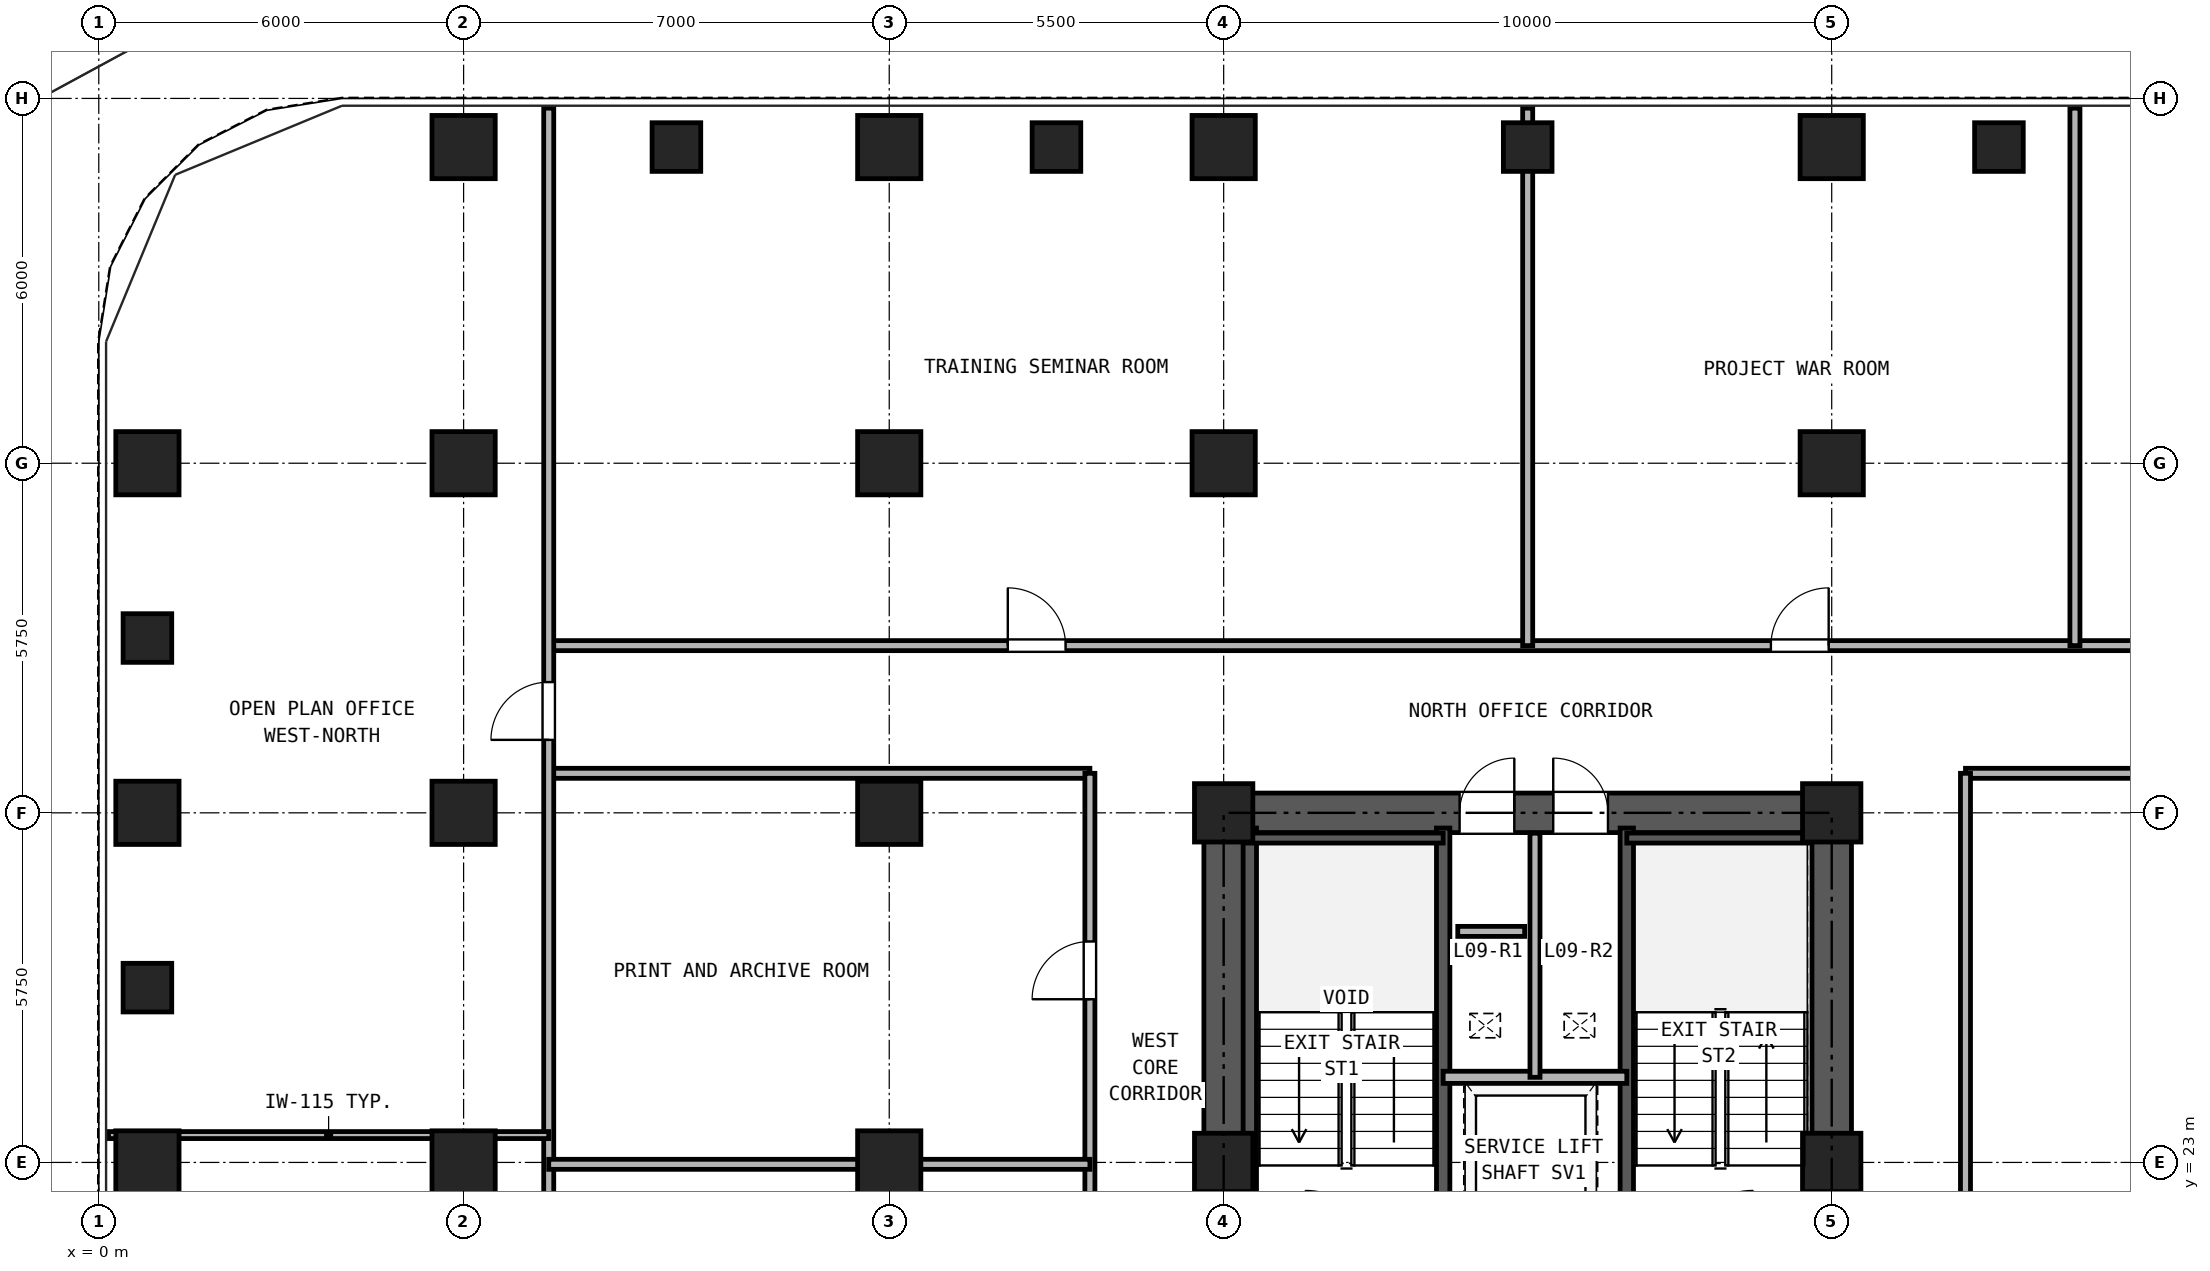
"""IFC4 building model, lengths in metres.
Left out: names, types, materials, properties, quantities, classifications, styles, units other than length and angle.
Written with IfcOpenShell. Run it as: python <this file> out.ifc"""

import sys

from ifc_helpers import new_model, si_unit, direction, frame, frame_2d, origin, origin_2d, place, context, subcontext, project, spatial, rectangle, hollow_rectangle, extrude, source, transform, mapped, element, fill, save


model = new_model("IFC4")
c1 = context("Model", 3, precision=1e-05, world=origin(), true_north=direction((0.0, 1.0)))
c2 = subcontext(c1, "Body", "Model", "MODEL_VIEW")
j1 = project(units=[si_unit("LENGTHUNIT", "METRE"), si_unit("PLANEANGLEUNIT", "RADIAN")], contexts=[c1])
p1 = place(None, origin())
s1 = spatial("IfcSite", under=j1, at=p1, CompositionType="ELEMENT")
p2 = place(p1, origin())
s2 = spatial("IfcBuilding", under=s1, at=p2, CompositionType="ELEMENT")
p3 = place(p2, frame((0.0, 0.0, 36.9)))
s3 = spatial("IfcBuildingStorey", under=s2, at=p3, CompositionType="ELEMENT", Elevation=36.9)
m1 = source(origin(), c2, "Body", "SweptSolid", [
    extrude(hollow_rectangle(XDim=1.04, YDim=1.04, WallThickness=0.065, at=origin_2d()), origin(), (0.0, 0.0, 1.0), 3.32),
])
for number, where, z_axis, x_axis in (
    (1, (6.0, 39.7, 0.0), (0.0, 0.0, 1.0), (1.0, 0.0, 0.0)),
    (2, (13.0, 39.7, 0.0), (0.0, 0.0, 1.0), (1.0, 0.0, 0.0)),
    (3, (18.5, 39.7, 0.0), (0.0, 0.0, 1.0), (1.0, 0.0, 0.0)),
    (4, (28.5, 39.7, 0.0), (0.0, 0.0, 1.0), (1.0, 0.0, 0.0)),
    (5, (0.8, 23.0, 0.0), (0.0, 0.0, 1.0), (1.0, 0.0, 0.0)),
    (6, (0.8, 28.75, 0.0), (0.0, 0.0, 1.0), (1.0, 0.0, 0.0)),
    (7, (0.8, 34.5, 0.0), (0.0, 0.0, 1.0), (1.0, 0.0, 0.0)),
    (8, (6.0, 23.0, 0.0), (0.0, 0.0, 1.0), (1.0, 0.0, 0.0)),
    (9, (6.0, 28.75, 0.0), (0.0, 0.0, 1.0), (1.0, 0.0, 0.0)),
    (10, (6.0, 34.5, 0.0), (0.0, 0.0, 1.0), (1.0, 0.0, 0.0)),
    (11, (13.0, 23.0, 0.0), (0.0, 0.0, 1.0), (1.0, 0.0, 0.0)),
    (12, (13.0, 28.75, 0.0), (0.0, 0.0, 1.0), (1.0, 0.0, 0.0)),
    (13, (13.0, 34.5, 0.0), (0.0, 0.0, 1.0), (1.0, 0.0, 0.0)),
):
    element("IfcColumn", number, at=place(p3, frame(where, z_axis=z_axis, x_axis=x_axis)), inside=s3, PredefinedType="COLUMN", context=c2, shape_type="MappedRepresentation", body=[
        mapped(m1, transform((0.0, 0.0, 0.0), x_axis=(1.0, 0.0, 0.0), y_axis=(0.0, 1.0, 0.0), z_axis=(0.0, 0.0, 1.0), scale=1.0)),
    ])
m2 = source(origin(), c2, "Body", "SweptSolid", [
    extrude(hollow_rectangle(XDim=0.96, YDim=0.96, WallThickness=0.06, at=origin_2d()), origin(), (0.0, 0.0, 1.0), 3.32),
])
for number, where, z_axis, x_axis in (
    (14, (18.5, 23.0, 0.0), (0.0, 0.0, 1.0), (1.0, 0.0, 0.0)),
    (15, (18.5, 28.75, 0.0), (0.0, 0.0, 1.0), (1.0, 0.0, 0.0)),
):
    element("IfcColumn", number, at=place(p3, frame(where, z_axis=z_axis, x_axis=x_axis)), inside=s3, PredefinedType="COLUMN", context=c2, shape_type="MappedRepresentation", body=[
        mapped(m2, transform((0.0, 0.0, 0.0), x_axis=(1.0, 0.0, 0.0), y_axis=(0.0, 1.0, 0.0), z_axis=(0.0, 0.0, 1.0), scale=1.0)),
    ])
p4 = place(p3, frame((18.5, 34.5, 0.0), z_axis=(0.0, 0.0, 1.0), x_axis=(1.0, 0.0, 0.0)))
e16 = element("IfcColumn", 16, at=p4, inside=s3, PredefinedType="COLUMN", context=c2, shape_type="MappedRepresentation", body=[
    mapped(m1, transform((0.0, 0.0, 0.0), x_axis=(1.0, 0.0, 0.0), y_axis=(0.0, 1.0, 0.0), z_axis=(0.0, 0.0, 1.0), scale=1.0)),
])
for number, where, z_axis, x_axis in (
    (17, (28.5, 23.0, 0.0), (0.0, 0.0, 1.0), (1.0, 0.0, 0.0)),
    (18, (28.5, 28.75, 0.0), (0.0, 0.0, 1.0), (1.0, 0.0, 0.0)),
):
    element("IfcColumn", number, at=place(p3, frame(where, z_axis=z_axis, x_axis=x_axis)), inside=s3, PredefinedType="COLUMN", context=c2, shape_type="MappedRepresentation", body=[
        mapped(m2, transform((0.0, 0.0, 0.0), x_axis=(1.0, 0.0, 0.0), y_axis=(0.0, 1.0, 0.0), z_axis=(0.0, 0.0, 1.0), scale=1.0)),
    ])
p5 = place(p3, frame((28.5, 34.5, 0.0), z_axis=(0.0, 0.0, 1.0), x_axis=(1.0, 0.0, 0.0)))
e19 = element("IfcColumn", 19, at=p5, inside=s3, PredefinedType="COLUMN", context=c2, shape_type="MappedRepresentation", body=[
    mapped(m1, transform((0.0, 0.0, 0.0), x_axis=(1.0, 0.0, 0.0), y_axis=(0.0, 1.0, 0.0), z_axis=(0.0, 0.0, 1.0), scale=1.0)),
])
m3 = source(origin(), c2, "Body", "SweptSolid", [
    extrude(hollow_rectangle(XDim=0.8, YDim=0.8, WallThickness=0.045, at=origin_2d()), origin(), (0.0, 0.0, 1.0), 3.32),
])
for number, where, z_axis, x_axis in (
    (20, (9.5, 39.7, 0.0), (0.0, 0.0, 1.0), (1.0, 0.0, 0.0)),
    (21, (15.75, 39.7, 0.0), (0.0, 0.0, 1.0), (1.0, 0.0, 0.0)),
    (22, (23.5, 39.7, 0.0), (0.0, 0.0, 1.0), (1.0, 0.0, 0.0)),
    (23, (31.25, 39.7, 0.0), (0.0, 0.0, 1.0), (1.0, 0.0, 0.0)),
    (24, (0.8, 25.875, 0.0), (0.0, 0.0, 1.0), (1.0, 0.0, 0.0)),
    (25, (0.8, 31.625, 0.0), (0.0, 0.0, 1.0), (1.0, 0.0, 0.0)),
):
    element("IfcColumn", number, at=place(p3, frame(where, z_axis=z_axis, x_axis=x_axis)), inside=s3, PredefinedType="COLUMN", context=c2, shape_type="MappedRepresentation", body=[
        mapped(m3, transform((0.0, 0.0, 0.0), x_axis=(1.0, 0.0, 0.0), y_axis=(0.0, 1.0, 0.0), z_axis=(0.0, 0.0, 1.0), scale=1.0)),
    ])
p6 = place(p3, frame((18.175, 28.75, 0.0), z_axis=(0.0, 0.0, 1.0), x_axis=(1.0, 0.0, 0.0)))
e26 = element("IfcWall", 26, at=p6, inside=s3, PredefinedType="SHEAR", context=c2, shape_type="SweptSolid", body=[
    extrude(rectangle(XDim=10.65, YDim=0.65, at=frame_2d((5.325, 0.0))), origin(), (0.0, 0.0, 1.0), 3.32),
])
p7 = place(p6, frame((4.205, 0.0, 0.0)))
e27 = element("IfcOpeningElement", 27, at=p7, cuts=e26, PredefinedType="OPENING", context=c2, shape_type="SweptSolid", body=[
    extrude(rectangle(XDim=0.9, YDim=2.05, at=frame_2d((0.45, 1.025))), frame((0.0, 0.335, 0.0), z_axis=(0.0, -1.0, 0.0), x_axis=(1.0, 0.0, 0.0)), (0.0, 0.0, 1.0), 0.67),
])
p8 = place(p6, frame((5.745, 0.0, 0.0)))
e28 = element("IfcOpeningElement", 28, at=p8, cuts=e26, PredefinedType="OPENING", context=c2, shape_type="SweptSolid", body=[
    extrude(rectangle(XDim=0.9, YDim=2.05, at=frame_2d((0.45, 1.025))), frame((0.0, 0.335, 0.0), z_axis=(0.0, -1.0, 0.0), x_axis=(1.0, 0.0, 0.0)), (0.0, 0.0, 1.0), 0.67),
])
p9 = place(p3, frame((18.5, 11.825, 0.0), z_axis=(0.0, 0.0, 1.0), x_axis=(0.0, 1.0, 0.0)))
e29 = element("IfcWall", 29, at=p9, inside=s3, PredefinedType="SHEAR", context=c2, shape_type="SweptSolid", body=[
    extrude(rectangle(XDim=16.6, YDim=0.65, at=frame_2d((8.3, 0.0))), origin(), (0.0, 0.0, 1.0), 3.32),
])
p10 = place(p9, frame((7.325, 0.0, 0.0)))
e30 = element("IfcOpeningElement", 30, at=p10, cuts=e29, PredefinedType="OPENING", context=c2, shape_type="SweptSolid", body=[
    extrude(rectangle(XDim=1.15, YDim=2.2, at=frame_2d((0.575, 1.1))), frame((0.0, 0.335, 0.0), z_axis=(0.0, -1.0, 0.0), x_axis=(1.0, 0.0, 0.0)), (0.0, 0.0, 1.0), 0.67),
])
p11 = place(p3, frame((28.5, 11.825, 0.0), z_axis=(0.0, 0.0, 1.0), x_axis=(0.0, 1.0, 0.0)))
e31 = element("IfcWall", 31, at=p11, inside=s3, PredefinedType="SHEAR", context=c2, shape_type="SweptSolid", body=[
    extrude(rectangle(XDim=16.6, YDim=0.65, at=frame_2d((8.3, 0.0))), origin(), (0.0, 0.0, 1.0), 3.32),
])
p12 = place(p11, frame((7.325, 0.0, 0.0)))
e32 = element("IfcOpeningElement", 32, at=p12, cuts=e31, PredefinedType="OPENING", context=c2, shape_type="SweptSolid", body=[
    extrude(rectangle(XDim=1.15, YDim=2.2, at=frame_2d((0.575, 1.1))), frame((0.0, 0.335, 0.0), z_axis=(0.0, -1.0, 0.0), x_axis=(1.0, 0.0, 0.0)), (0.0, 0.0, 1.0), 0.67),
])
for number, where, z_axis, x_axis in (
    (33, (18.93, 21.39, 0.0), (0.0, 0.0, 1.0), (0.0, 1.0, 0.0)),
    (34, (22.11, 21.39, 0.0), (0.0, 0.0, 1.0), (0.0, 1.0, 0.0)),
    (35, (25.13, 21.39, 0.0), (0.0, 0.0, 1.0), (0.0, 1.0, 0.0)),
):
    element("IfcWall", number, at=place(p3, frame(where, z_axis=z_axis, x_axis=x_axis)), inside=s3, PredefinedType="SOLIDWALL", context=c2, shape_type="SweptSolid", body=[
        extrude(rectangle(XDim=7.11, YDim=0.22, at=frame_2d((3.555, 0.0))), origin(), (0.0, 0.0, 1.0), 3.32),
    ])
p13 = place(p3, frame((18.835, 28.335, 0.0), z_axis=(0.0, 0.0, 1.0), x_axis=(1.0, 0.0, 0.0)))
e36 = element("IfcWall", 36, at=p13, inside=s3, PredefinedType="PARTITIONING", context=c2, shape_type="SweptSolid", body=[
    extrude(rectangle(XDim=3.275, YDim=0.165, at=frame_2d((1.638, 0.0))), origin(), (0.0, 0.0, 1.0), 3.32),
])
p14 = place(p3, frame((25.13, 28.335, 0.0), z_axis=(0.0, 0.0, 1.0), x_axis=(1.0, 0.0, 0.0)))
e37 = element("IfcWall", 37, at=p14, inside=s3, PredefinedType="PARTITIONING", context=c2, shape_type="SweptSolid", body=[
    extrude(rectangle(XDim=3.035, YDim=0.165, at=frame_2d((1.518, 0.0))), origin(), (0.0, 0.0, 1.0), 3.32),
])
p15 = place(p3, frame((22.11, 24.4, 0.0), z_axis=(0.0, 0.0, 1.0), x_axis=(1.0, 0.0, 0.0)))
e38 = element("IfcWall", 38, at=p15, inside=s3, PredefinedType="PARTITIONING", context=c2, shape_type="SweptSolid", body=[
    extrude(rectangle(XDim=3.02, YDim=0.2, at=frame_2d((1.51, 0.0))), origin(), (0.0, 0.0, 1.0), 3.32),
])
p16 = place(p3, frame((23.62, 24.4, 0.0), z_axis=(0.0, 0.0, 1.0), x_axis=(0.0, 1.0, 0.0)))
e39 = element("IfcWall", 39, at=p16, inside=s3, PredefinedType="PARTITIONING", context=c2, shape_type="SweptSolid", body=[
    extrude(rectangle(XDim=4.015, YDim=0.165, at=frame_2d((2.008, 0.0))), origin(), (0.0, 0.0, 1.0), 3.32),
])
p17 = place(p3, frame((7.4, 31.5, 0.0), z_axis=(0.0, 0.0, 1.0), x_axis=(1.0, 0.0, 0.0)))
e40 = element("IfcWall", 40, at=p17, inside=s3, PredefinedType="PARTITIONING", context=c2, shape_type="SweptSolid", body=[
    extrude(rectangle(XDim=32.2, YDim=0.165, at=frame_2d((16.1, 0.0))), origin(), (0.0, 0.0, 1.0), 2.898),
])
p18 = place(p17, frame((7.55, 0.0, 0.0)))
e41 = element("IfcOpeningElement", 41, at=p18, cuts=e40, PredefinedType="OPENING", context=c2, shape_type="SweptSolid", body=[
    extrude(rectangle(XDim=0.95, YDim=2.15, at=frame_2d((0.475, 1.075))), frame((0.0, 0.093, 0.0), z_axis=(0.0, -1.0, 0.0), x_axis=(1.0, 0.0, 0.0)), (0.0, 0.0, 1.0), 0.185),
])
p19 = place(p17, frame((20.1, 0.0, 0.0)))
e42 = element("IfcOpeningElement", 42, at=p19, cuts=e40, PredefinedType="OPENING", context=c2, shape_type="SweptSolid", body=[
    extrude(rectangle(XDim=0.95, YDim=2.15, at=frame_2d((0.475, 1.075))), frame((0.0, 0.093, 0.0), z_axis=(0.0, -1.0, 0.0), x_axis=(1.0, 0.0, 0.0)), (0.0, 0.0, 1.0), 0.185),
])
p20 = place(p17, frame((28.15, 0.0, 0.0)))
e43 = element("IfcOpeningElement", 43, at=p20, cuts=e40, PredefinedType="OPENING", context=c2, shape_type="SweptSolid", body=[
    extrude(rectangle(XDim=0.95, YDim=2.15, at=frame_2d((0.475, 1.075))), frame((0.0, 0.093, 0.0), z_axis=(0.0, -1.0, 0.0), x_axis=(1.0, 0.0, 0.0)), (0.0, 0.0, 1.0), 0.185),
])
for number, where, z_axis, x_axis in (
    (44, (7.4, 29.4, 0.0), (0.0, 0.0, 1.0), (1.0, 0.0, 0.0)),
    (45, (30.7, 29.4, 0.0), (0.0, 0.0, 1.0), (1.0, 0.0, 0.0)),
):
    element("IfcWall", number, at=place(p3, frame(where, z_axis=z_axis, x_axis=x_axis)), inside=s3, PredefinedType="PARTITIONING", context=c2, shape_type="SweptSolid", body=[
        extrude(rectangle(XDim=8.9, YDim=0.165, at=frame_2d((4.45, 0.0))), origin(), (0.0, 0.0, 1.0), 3.32),
    ])
p21 = place(p3, frame((16.3, 11.15, 0.0), z_axis=(0.0, 0.0, 1.0), x_axis=(0.0, 1.0, 0.0)))
e46 = element("IfcWall", 46, at=p21, inside=s3, PredefinedType="PARTITIONING", context=c2, shape_type="SweptSolid", body=[
    extrude(rectangle(XDim=18.25, YDim=0.165, at=frame_2d((9.125, 0.0))), origin(), (0.0, 0.0, 1.0), 3.32),
])
p22 = place(p21, frame((5.409, 0.0, 0.0)))
e47 = element("IfcOpeningElement", 47, at=p22, cuts=e46, PredefinedType="OPENING", context=c2, shape_type="SweptSolid", body=[
    extrude(rectangle(XDim=0.95, YDim=2.15, at=frame_2d((0.475, 1.075))), frame((0.0, 0.093, 0.0), z_axis=(0.0, -1.0, 0.0), x_axis=(1.0, 0.0, 0.0)), (0.0, 0.0, 1.0), 0.185),
])
p23 = place(p21, frame((14.534, 0.0, 0.0)))
e48 = element("IfcOpeningElement", 48, at=p23, cuts=e46, PredefinedType="OPENING", context=c2, shape_type="SweptSolid", body=[
    extrude(rectangle(XDim=0.95, YDim=2.15, at=frame_2d((0.475, 1.075))), frame((0.0, 0.093, 0.0), z_axis=(0.0, -1.0, 0.0), x_axis=(1.0, 0.0, 0.0)), (0.0, 0.0, 1.0), 0.185),
])
p24 = place(p3, frame((30.7, 11.15, 0.0), z_axis=(0.0, 0.0, 1.0), x_axis=(0.0, 1.0, 0.0)))
e49 = element("IfcWall", 49, at=p24, inside=s3, PredefinedType="PARTITIONING", context=c2, shape_type="SweptSolid", body=[
    extrude(rectangle(XDim=18.25, YDim=0.165, at=frame_2d((9.125, 0.0))), origin(), (0.0, 0.0, 1.0), 3.32),
])
p25 = place(p24, frame((8.625, 0.0, 0.0)))
e50 = element("IfcOpeningElement", 50, at=p25, cuts=e49, PredefinedType="OPENING", context=c2, shape_type="SweptSolid", body=[
    extrude(rectangle(XDim=0.95, YDim=2.15, at=frame_2d((0.475, 1.075))), frame((0.0, 0.093, 0.0), z_axis=(0.0, -1.0, 0.0), x_axis=(1.0, 0.0, 0.0)), (0.0, 0.0, 1.0), 0.185),
])
p26 = place(p3, frame((7.4, 0.16, 0.0), z_axis=(0.0, 0.0, 1.0), x_axis=(0.0, 1.0, 0.0)))
e51 = element("IfcWall", 51, at=p26, inside=s3, PredefinedType="PARTITIONING", context=c2, shape_type="SweptSolid", body=[
    extrude(rectangle(XDim=40.18, YDim=0.165, at=frame_2d((20.09, 0.0))), origin(), (0.0, 0.0, 1.0), 3.32),
])
p27 = place(p26, frame((9.44, 0.0, 0.0)))
e52 = element("IfcOpeningElement", 52, at=p27, cuts=e51, PredefinedType="OPENING", context=c2, shape_type="SweptSolid", body=[
    extrude(rectangle(XDim=0.95, YDim=2.15, at=frame_2d((0.475, 1.075))), frame((0.0, 0.093, 0.0), z_axis=(0.0, -1.0, 0.0), x_axis=(1.0, 0.0, 0.0)), (0.0, 0.0, 1.0), 0.185),
])
p28 = place(p26, frame((29.79, 0.0, 0.0)))
e53 = element("IfcOpeningElement", 53, at=p28, cuts=e51, PredefinedType="OPENING", context=c2, shape_type="SweptSolid", body=[
    extrude(rectangle(XDim=0.95, YDim=2.15, at=frame_2d((0.475, 1.075))), frame((0.0, 0.093, 0.0), z_axis=(0.0, -1.0, 0.0), x_axis=(1.0, 0.0, 0.0)), (0.0, 0.0, 1.0), 0.185),
])
for number, where, z_axis, x_axis in (
    (54, (23.5, 31.5, 0.0), (0.0, 0.0, 1.0), (0.0, 1.0, 0.0)),
    (55, (32.5, 31.5, 0.0), (0.0, 0.0, 1.0), (0.0, 1.0, 0.0)),
):
    element("IfcWall", number, at=place(p3, frame(where, z_axis=z_axis, x_axis=x_axis)), inside=s3, PredefinedType="PARTITIONING", context=c2, shape_type="SweptSolid", body=[
        extrude(rectangle(XDim=8.84, YDim=0.165, at=frame_2d((4.42, 0.0))), origin(), (0.0, 0.0, 1.0), 3.32),
    ])
p29 = place(p3, frame((0.16, 23.45, 0.0), z_axis=(0.0, 0.0, 1.0), x_axis=(1.0, 0.0, 0.0)))
e56 = element("IfcWall", 56, at=p29, inside=s3, PredefinedType="PARTITIONING", context=c2, shape_type="SweptSolid", body=[
    extrude(rectangle(XDim=7.24, YDim=0.115, at=frame_2d((3.62, 0.0))), origin(), (0.0, 0.0, 1.0), 3.32),
])
p30 = place(p3, frame((7.4, 22.969, 0.0), z_axis=(0.0, 0.0, 1.0), x_axis=(1.0, 0.0, 0.0)))
e57 = element("IfcWall", 57, at=p30, inside=s3, PredefinedType="PARTITIONING", context=c2, shape_type="SweptSolid", body=[
    extrude(rectangle(XDim=8.9, YDim=0.165, at=frame_2d((4.45, 0.0))), origin(), (0.0, 0.0, 1.0), 2.539),
])
p31 = place(p3, frame((22.35, 26.8, 0.0), z_axis=(0.0, 0.0, 1.0), x_axis=(1.0, 0.0, 0.0)))
e58 = element("IfcWall", 58, at=p31, inside=s3, PredefinedType="PARTITIONING", context=c2, shape_type="SweptSolid", body=[
    extrude(rectangle(XDim=1.1, YDim=0.165, at=frame_2d((0.55, 0.0))), origin(), (0.0, 0.0, 1.0), 3.32),
])
p32 = place(p7, origin())
e59 = element("IfcDoor", 59, at=p32, inside=s3, OperationType="SINGLE_SWING_RIGHT", PredefinedType="DOOR", context=c2, shape_type="SweptSolid", body=[
    extrude(rectangle(XDim=0.9, YDim=2.05, at=frame_2d((0.45, 1.025))), frame((0.0, 0.025, 0.0), z_axis=(0.0, -1.0, 0.0), x_axis=(1.0, 0.0, 0.0)), (0.0, 0.0, 1.0), 0.05),
])
fill(e27, e59)
p33 = place(p8, origin())
e60 = element("IfcDoor", 60, at=p33, inside=s3, OperationType="SINGLE_SWING_LEFT", PredefinedType="DOOR", context=c2, shape_type="SweptSolid", body=[
    extrude(rectangle(XDim=0.9, YDim=2.05, at=frame_2d((0.45, 1.025))), frame((0.0, 0.025, 0.0), z_axis=(0.0, -1.0, 0.0), x_axis=(1.0, 0.0, 0.0)), (0.0, 0.0, 1.0), 0.05),
])
fill(e28, e60)
p34 = place(p18, origin())
e61 = element("IfcDoor", 61, at=p34, inside=s3, OperationType="SINGLE_SWING_LEFT", PredefinedType="DOOR", context=c2, shape_type="SweptSolid", body=[
    extrude(rectangle(XDim=0.95, YDim=2.15, at=frame_2d((0.475, 1.075))), frame((0.0, 0.025, 0.0), z_axis=(0.0, -1.0, 0.0), x_axis=(1.0, 0.0, 0.0)), (0.0, 0.0, 1.0), 0.05),
])
fill(e41, e61)
p35 = place(p19, origin())
e62 = element("IfcDoor", 62, at=p35, inside=s3, OperationType="SINGLE_SWING_RIGHT", PredefinedType="DOOR", context=c2, shape_type="SweptSolid", body=[
    extrude(rectangle(XDim=0.95, YDim=2.15, at=frame_2d((0.475, 1.075))), frame((0.0, 0.025, 0.0), z_axis=(0.0, -1.0, 0.0), x_axis=(1.0, 0.0, 0.0)), (0.0, 0.0, 1.0), 0.05),
])
fill(e42, e62)
p36 = place(p28, frame((0.95, 0.0, 0.0), z_axis=(0.0, 0.0, 1.0), x_axis=(-1.0, 0.0, 0.0)))
e63 = element("IfcDoor", 63, at=p36, inside=s3, OperationType="SINGLE_SWING_LEFT", PredefinedType="DOOR", context=c2, shape_type="SweptSolid", body=[
    extrude(rectangle(XDim=0.95, YDim=2.15, at=frame_2d((0.475, 1.075))), frame((0.0, 0.025, 0.0), z_axis=(0.0, -1.0, 0.0), x_axis=(1.0, 0.0, 0.0)), (0.0, 0.0, 1.0), 0.05),
])
fill(e53, e63)
p37 = place(p23, frame((0.95, 0.0, 0.0), z_axis=(0.0, 0.0, 1.0), x_axis=(-1.0, 0.0, 0.0)))
e64 = element("IfcDoor", 64, at=p37, inside=s3, OperationType="SINGLE_SWING_LEFT", PredefinedType="DOOR", context=c2, shape_type="SweptSolid", body=[
    extrude(rectangle(XDim=0.95, YDim=2.15, at=frame_2d((0.475, 1.075))), frame((0.0, 0.025, 0.0), z_axis=(0.0, -1.0, 0.0), x_axis=(1.0, 0.0, 0.0)), (0.0, 0.0, 1.0), 0.05),
])
fill(e48, e64)
save(model, sys.argv[1])
